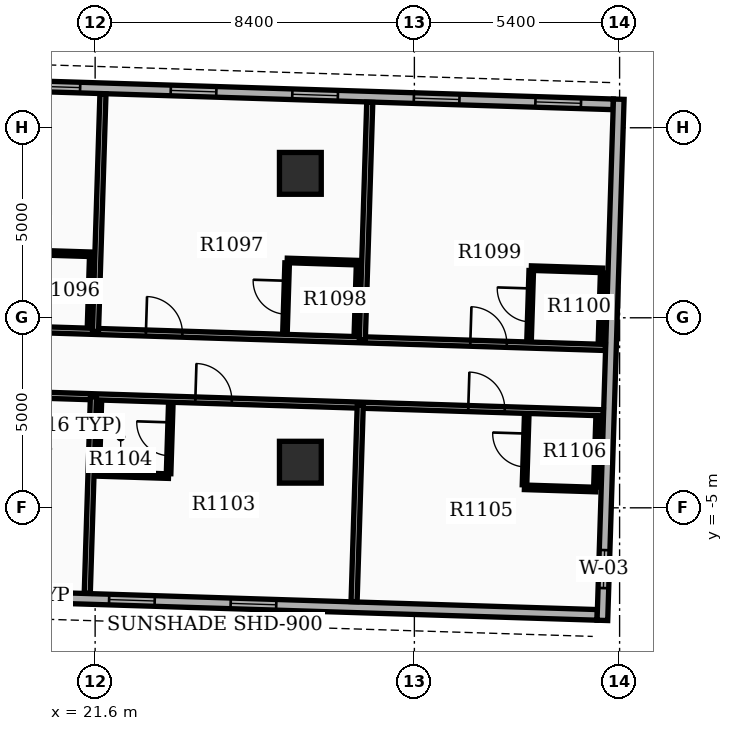
"""IFC4 building model, lengths in metres.
Left out: names, types, materials, properties, quantities, classifications, styles, units other than length and angle.
Written with IfcOpenShell. Run it as: python <this file> out.ifc"""

import sys

from ifc_helpers import new_model, si_unit, direction, frame, frame_2d, origin, origin_2d, place, context, subcontext, project, spatial, rectangle, extrude, element, fill, save


model = new_model("IFC4")
c1 = context("Model", 3, precision=1e-05, world=origin(), true_north=direction((0.0, 1.0)))
c2 = subcontext(c1, "Body", "Model", "MODEL_VIEW")
j1 = project(units=[si_unit("LENGTHUNIT", "METRE"), si_unit("PLANEANGLEUNIT", "RADIAN")], contexts=[c1])
p1 = place(None, origin())
s1 = spatial("IfcSite", under=j1, at=p1, CompositionType="ELEMENT")
p2 = place(p1, origin())
s2 = spatial("IfcBuilding", under=s1, at=p2, CompositionType="ELEMENT")
p3 = place(p2, frame((0.0, 0.0, 71.7)))
s3 = spatial("IfcBuildingStorey", under=s2, at=p3, CompositionType="ELEMENT", Elevation=71.7)
for number, where, z_axis, x_axis in (
    (1, (27.0, -3.8, 0.0), (0.0, 0.0, 1.0), (1.0, 0.0, 0.0)),
    (2, (27.0, 3.8, 0.0), (0.0, 0.0, 1.0), (1.0, 0.0, 0.0)),
):
    element("IfcColumn", number, at=place(p3, frame(where, z_axis=z_axis, x_axis=x_axis)), inside=s3, PredefinedType="COLUMN", context=c2, shape_type="SweptSolid", body=[
        extrude(rectangle(XDim=1.1, YDim=1.1, at=origin_2d()), origin(), (0.0, 0.0, 1.0), 3.9),
    ])
p4 = place(p3, frame((14.721, -7.186, 0.0), z_axis=(0.0, 0.0, 1.0), x_axis=(0.999506574096, -0.031410322165, 0.0)))
e3 = element("IfcWall", 3, at=p4, inside=s3, PredefinedType="STANDARD", context=c2, shape_type="SweptSolid", body=[
    extrude(rectangle(XDim=20.1, YDim=0.28, at=frame_2d((10.05, 0.0))), origin(), (0.0, 0.0, 1.0), 2.91),
])
p5 = place(p4, frame((4.05, 0.0, 0.8)))
e4 = element("IfcOpeningElement", 4, at=p5, cuts=e3, PredefinedType="OPENING", context=c2, shape_type="SweptSolid", body=[
    extrude(rectangle(XDim=1.2, YDim=1.6, at=frame_2d((0.6, 0.8))), frame((0.0, 0.15, 0.0), z_axis=(0.0, -1.0, 0.0), x_axis=(1.0, 0.0, 0.0)), (0.0, 0.0, 1.0), 0.3),
])
p6 = place(p4, frame((7.25, 0.0, 0.8)))
e5 = element("IfcOpeningElement", 5, at=p6, cuts=e3, PredefinedType="OPENING", context=c2, shape_type="SweptSolid", body=[
    extrude(rectangle(XDim=1.2, YDim=1.6, at=frame_2d((0.6, 0.8))), frame((0.0, 0.15, 0.0), z_axis=(0.0, -1.0, 0.0), x_axis=(1.0, 0.0, 0.0)), (0.0, 0.0, 1.0), 0.3),
])
p7 = place(p4, frame((10.45, 0.0, 0.8)))
e6 = element("IfcOpeningElement", 6, at=p7, cuts=e3, PredefinedType="OPENING", context=c2, shape_type="SweptSolid", body=[
    extrude(rectangle(XDim=1.2, YDim=1.6, at=frame_2d((0.6, 0.8))), frame((0.0, 0.15, 0.0), z_axis=(0.0, -1.0, 0.0), x_axis=(1.0, 0.0, 0.0)), (0.0, 0.0, 1.0), 0.3),
])
p8 = place(p4, frame((0.3, 0.0, 0.0)))
e7 = element("IfcOpeningElement", 7, at=p8, cuts=e3, PredefinedType="OPENING", context=c2, shape_type="SweptSolid", body=[
    extrude(rectangle(XDim=0.96, YDim=2.1, at=frame_2d((0.48, 1.05))), frame((0.0, 0.15, 0.0), z_axis=(0.0, -1.0, 0.0), x_axis=(1.0, 0.0, 0.0)), (0.0, 0.0, 1.0), 0.3),
])
p9 = place(p3, frame((35.234, 5.616, 0.0), z_axis=(0.0, 0.0, 1.0), x_axis=(-0.999506955354, 0.031398187845, 0.0)))
e8 = element("IfcWall", 8, at=p9, inside=s3, PredefinedType="STANDARD", context=c2, shape_type="SweptSolid", body=[
    extrude(rectangle(XDim=20.1, YDim=0.28, at=frame_2d((10.05, 0.0))), origin(), (0.0, 0.0, 1.0), 2.91),
])
p10 = place(p9, frame((0.85, 0.0, 0.8)))
e9 = element("IfcOpeningElement", 9, at=p10, cuts=e8, PredefinedType="OPENING", context=c2, shape_type="SweptSolid", body=[
    extrude(rectangle(XDim=1.2, YDim=1.6, at=frame_2d((0.6, 0.8))), frame((0.0, 0.15, 0.0), z_axis=(0.0, -1.0, 0.0), x_axis=(1.0, 0.0, 0.0)), (0.0, 0.0, 1.0), 0.3),
])
p11 = place(p9, frame((4.05, 0.0, 0.8)))
e10 = element("IfcOpeningElement", 10, at=p11, cuts=e8, PredefinedType="OPENING", context=c2, shape_type="SweptSolid", body=[
    extrude(rectangle(XDim=1.2, YDim=1.6, at=frame_2d((0.6, 0.8))), frame((0.0, 0.15, 0.0), z_axis=(0.0, -1.0, 0.0), x_axis=(1.0, 0.0, 0.0)), (0.0, 0.0, 1.0), 0.3),
])
p12 = place(p9, frame((7.25, 0.0, 0.8)))
e11 = element("IfcOpeningElement", 11, at=p12, cuts=e8, PredefinedType="OPENING", context=c2, shape_type="SweptSolid", body=[
    extrude(rectangle(XDim=1.2, YDim=1.6, at=frame_2d((0.6, 0.8))), frame((0.0, 0.15, 0.0), z_axis=(0.0, -1.0, 0.0), x_axis=(1.0, 0.0, 0.0)), (0.0, 0.0, 1.0), 0.3),
])
p13 = place(p9, frame((10.45, 0.0, 0.8)))
e12 = element("IfcOpeningElement", 12, at=p13, cuts=e8, PredefinedType="OPENING", context=c2, shape_type="SweptSolid", body=[
    extrude(rectangle(XDim=1.2, YDim=1.6, at=frame_2d((0.6, 0.8))), frame((0.0, 0.15, 0.0), z_axis=(0.0, -1.0, 0.0), x_axis=(1.0, 0.0, 0.0)), (0.0, 0.0, 1.0), 0.3),
])
p14 = place(p9, frame((14.035, 0.0, 0.85)))
e13 = element("IfcOpeningElement", 13, at=p14, cuts=e8, PredefinedType="OPENING", context=c2, shape_type="SweptSolid", body=[
    extrude(rectangle(XDim=1.2, YDim=1.6, at=frame_2d((0.6, 0.8))), frame((0.0, 0.15, 0.0), z_axis=(0.0, -1.0, 0.0), x_axis=(1.0, 0.0, 0.0)), (0.0, 0.0, 1.0), 0.3),
])
p15 = place(p3, frame((34.947, -7.962, 0.0), z_axis=(0.0, 0.0, 1.0), x_axis=(0.031406966164, 0.999506679556, 0.0)))
e14 = element("IfcWall", 14, at=p15, inside=s3, PredefinedType="STANDARD", context=c2, shape_type="SweptSolid", body=[
    extrude(rectangle(XDim=13.72, YDim=0.28, at=frame_2d((6.86, 0.0))), origin(), (0.0, 0.0, 1.0), 2.91),
])
p16 = place(p15, frame((0.85, 0.0, 0.85)))
e15 = element("IfcOpeningElement", 15, at=p16, cuts=e14, PredefinedType="OPENING", context=c2, shape_type="SweptSolid", body=[
    extrude(rectangle(XDim=1.0, YDim=1.5, at=frame_2d((0.5, 0.75))), frame((0.0, 0.15, 0.0), z_axis=(0.0, -1.0, 0.0), x_axis=(1.0, 0.0, 0.0)), (0.0, 0.0, 1.0), 0.3),
])
p17 = place(p3, frame((14.853, -0.146, 0.0), z_axis=(0.0, 0.0, 1.0), x_axis=(0.999506406629, -0.031415650687, 0.0)))
e16 = element("IfcWall", 16, at=p17, inside=s3, PredefinedType="PARTITIONING", context=c2, shape_type="SweptSolid", body=[
    extrude(rectangle(XDim=20.182, YDim=0.16, at=frame_2d((10.091, 0.0))), origin(), (0.0, 0.0, 1.0), 2.9),
])
p18 = place(p17, frame((0.45, 0.0, 0.0)))
e17 = element("IfcOpeningElement", 17, at=p18, cuts=e16, PredefinedType="OPENING", context=c2, shape_type="SweptSolid", body=[
    extrude(rectangle(XDim=0.96, YDim=2.15, at=frame_2d((0.48, 1.075))), frame((0.0, 0.09, 0.0), z_axis=(0.0, -1.0, 0.0), x_axis=(1.0, 0.0, 0.0)), (0.0, 0.0, 1.0), 0.18),
])
p19 = place(p17, frame((8.087, 0.0, 0.0)))
e18 = element("IfcOpeningElement", 18, at=p19, cuts=e16, PredefinedType="OPENING", context=c2, shape_type="SweptSolid", body=[
    extrude(rectangle(XDim=0.96, YDim=2.15, at=frame_2d((0.48, 1.075))), frame((0.0, 0.09, 0.0), z_axis=(0.0, -1.0, 0.0), x_axis=(1.0, 0.0, 0.0)), (0.0, 0.0, 1.0), 0.18),
])
p20 = place(p17, frame((16.627, 0.0, 0.0)))
e19 = element("IfcOpeningElement", 19, at=p20, cuts=e16, PredefinedType="OPENING", context=c2, shape_type="SweptSolid", body=[
    extrude(rectangle(XDim=0.96, YDim=2.15, at=frame_2d((0.48, 1.075))), frame((0.0, 0.09, 0.0), z_axis=(0.0, -1.0, 0.0), x_axis=(1.0, 0.0, 0.0)), (0.0, 0.0, 1.0), 0.18),
])
p21 = place(p3, frame((21.609, -0.359, 0.0), z_axis=(0.0, 0.0, 1.0), x_axis=(0.031435911097, 0.999505769615, 0.0)))
e20 = element("IfcWall", 20, at=p21, inside=s3, PredefinedType="PARTITIONING", context=c2, shape_type="SweptSolid", body=[
    extrude(rectangle(XDim=6.252, YDim=0.16, at=frame_2d((3.126, 0.0))), origin(), (0.0, 0.0, 1.0), 2.9),
])
p22 = place(p3, frame((21.454, -0.214, 0.0), z_axis=(0.0, 0.0, 1.0), x_axis=(0.031389704724, 0.999507221803, 0.0)))
e21 = element("IfcWall", 21, at=p22, inside=s3, PredefinedType="PARTITIONING", context=c2, shape_type="SweptSolid", body=[
    extrude(rectangle(XDim=1.82, YDim=0.12, at=frame_2d((0.91, 0.0))), origin(), (0.0, 0.0, 1.0), 2.9),
])
p23 = place(p3, frame((19.634, 1.729, 0.0), z_axis=(0.0, 0.0, 1.0), x_axis=(0.999510173889, -0.031295563454, 0.0)))
e22 = element("IfcWall", 22, at=p23, inside=s3, PredefinedType="PARTITIONING", context=c2, shape_type="SweptSolid", body=[
    extrude(rectangle(XDim=1.88, YDim=0.12, at=frame_2d((0.94, 0.0))), origin(), (0.0, 0.0, 1.0), 2.9),
])
p24 = place(p3, frame((28.63, -0.58, 0.0), z_axis=(0.0, 0.0, 1.0), x_axis=(0.031434684154, 0.999505808203, 0.0)))
e23 = element("IfcWall", 23, at=p24, inside=s3, PredefinedType="PARTITIONING", context=c2, shape_type="SweptSolid", body=[
    extrude(rectangle(XDim=6.252, YDim=0.16, at=frame_2d((3.126, 0.0))), origin(), (0.0, 0.0, 1.0), 2.9),
])
p25 = place(p3, frame((26.595, -0.375, 0.0), z_axis=(0.0, 0.0, 1.0), x_axis=(0.03152371574, 0.999503004171, 0.0)))
e24 = element("IfcWall", 24, at=p25, inside=s3, PredefinedType="PARTITIONING", context=c2, shape_type="SweptSolid", body=[
    extrude(rectangle(XDim=1.82, YDim=0.12, at=frame_2d((0.91, 0.0))), origin(), (0.0, 0.0, 1.0), 2.9),
])
p26 = place(p25, frame((0.47, 0.0, 0.0)))
e25 = element("IfcOpeningElement", 25, at=p26, cuts=e24, PredefinedType="OPENING", context=c2, shape_type="SweptSolid", body=[
    extrude(rectangle(XDim=0.88, YDim=2.1, at=frame_2d((0.44, 1.05))), frame((0.0, 0.07, 0.0), z_axis=(0.0, -1.0, 0.0), x_axis=(1.0, 0.0, 0.0)), (0.0, 0.0, 1.0), 0.14),
])
p27 = place(p3, frame((28.474, -0.435, 0.0), z_axis=(0.0, 0.0, 1.0), x_axis=(0.031389704724, 0.999507221803, 0.0)))
e26 = element("IfcWall", 26, at=p27, inside=s3, PredefinedType="PARTITIONING", context=c2, shape_type="SweptSolid", body=[
    extrude(rectangle(XDim=1.82, YDim=0.12, at=frame_2d((0.91, 0.0))), origin(), (0.0, 0.0, 1.0), 2.9),
])
p28 = place(p3, frame((26.655, 1.509, 0.0), z_axis=(0.0, 0.0, 1.0), x_axis=(0.999506103526, -0.031425292588, 0.0)))
e27 = element("IfcWall", 27, at=p28, inside=s3, PredefinedType="PARTITIONING", context=c2, shape_type="SweptSolid", body=[
    extrude(rectangle(XDim=1.88, YDim=0.12, at=frame_2d((0.94, 0.0))), origin(), (0.0, 0.0, 1.0), 2.9),
])
p29 = place(p3, frame((33.018, -0.577, 0.0), z_axis=(0.0, 0.0, 1.0), x_axis=(0.031255692016, 0.999511421504, 0.0)))
e28 = element("IfcWall", 28, at=p29, inside=s3, PredefinedType="PARTITIONING", context=c2, shape_type="SweptSolid", body=[
    extrude(rectangle(XDim=1.82, YDim=0.12, at=frame_2d((0.91, 0.0))), origin(), (0.0, 0.0, 1.0), 2.9),
])
p30 = place(p29, frame((0.47, 0.0, 0.0)))
e29 = element("IfcOpeningElement", 29, at=p30, cuts=e28, PredefinedType="OPENING", context=c2, shape_type="SweptSolid", body=[
    extrude(rectangle(XDim=0.88, YDim=2.1, at=frame_2d((0.44, 1.05))), frame((0.0, 0.07, 0.0), z_axis=(0.0, -1.0, 0.0), x_axis=(1.0, 0.0, 0.0)), (0.0, 0.0, 1.0), 0.14),
])
p31 = place(p3, frame((34.897, -0.636, 0.0), z_axis=(0.0, 0.0, 1.0), x_axis=(0.031389704724, 0.999507221803, 0.0)))
e30 = element("IfcWall", 30, at=p31, inside=s3, PredefinedType="PARTITIONING", context=c2, shape_type="SweptSolid", body=[
    extrude(rectangle(XDim=1.82, YDim=0.12, at=frame_2d((0.91, 0.0))), origin(), (0.0, 0.0, 1.0), 2.9),
])
p32 = place(p3, frame((33.077, 1.307, 0.0), z_axis=(0.0, 0.0, 1.0), x_axis=(0.999505975261, -0.031429371883, 0.0)))
e31 = element("IfcWall", 31, at=p32, inside=s3, PredefinedType="PARTITIONING", context=c2, shape_type="SweptSolid", body=[
    extrude(rectangle(XDim=1.88, YDim=0.12, at=frame_2d((0.94, 0.0))), origin(), (0.0, 0.0, 1.0), 2.9),
])
p33 = place(p3, frame((14.799, -1.866, 0.0), z_axis=(0.0, 0.0, 1.0), x_axis=(0.999506406629, -0.031415650687, 0.0)))
e32 = element("IfcWall", 32, at=p33, inside=s3, PredefinedType="PARTITIONING", context=c2, shape_type="SweptSolid", body=[
    extrude(rectangle(XDim=20.182, YDim=0.16, at=frame_2d((10.091, 0.0))), origin(), (0.0, 0.0, 1.0), 2.9),
])
p34 = place(p33, frame((2.656, 0.0, 0.0)))
e33 = element("IfcOpeningElement", 33, at=p34, cuts=e32, PredefinedType="OPENING", context=c2, shape_type="SweptSolid", body=[
    extrude(rectangle(XDim=0.96, YDim=2.15, at=frame_2d((0.48, 1.075))), frame((0.0, 0.09, 0.0), z_axis=(0.0, -1.0, 0.0), x_axis=(1.0, 0.0, 0.0)), (0.0, 0.0, 1.0), 0.18),
])
p35 = place(p33, frame((9.442, 0.0, 0.0)))
e34 = element("IfcOpeningElement", 34, at=p35, cuts=e32, PredefinedType="OPENING", context=c2, shape_type="SweptSolid", body=[
    extrude(rectangle(XDim=0.96, YDim=2.15, at=frame_2d((0.48, 1.075))), frame((0.0, 0.09, 0.0), z_axis=(0.0, -1.0, 0.0), x_axis=(1.0, 0.0, 0.0)), (0.0, 0.0, 1.0), 0.18),
])
p36 = place(p33, frame((16.627, 0.0, 0.0)))
e35 = element("IfcOpeningElement", 35, at=p36, cuts=e32, PredefinedType="OPENING", context=c2, shape_type="SweptSolid", body=[
    extrude(rectangle(XDim=0.96, YDim=2.15, at=frame_2d((0.48, 1.075))), frame((0.0, 0.09, 0.0), z_axis=(0.0, -1.0, 0.0), x_axis=(1.0, 0.0, 0.0)), (0.0, 0.0, 1.0), 0.18),
])
p37 = place(p3, frame((21.555, -2.078, 0.0), z_axis=(0.0, 0.0, 1.0), x_axis=(-0.031390964211, -0.999507182248, 0.0)))
e36 = element("IfcWall", 36, at=p37, inside=s3, PredefinedType="PARTITIONING", context=c2, shape_type="SweptSolid", body=[
    extrude(rectangle(XDim=5.172, YDim=0.16, at=frame_2d((2.586, 0.0))), origin(), (0.0, 0.0, 1.0), 2.9),
])
p38 = place(p3, frame((28.576, -2.299, 0.0), z_axis=(0.0, 0.0, 1.0), x_axis=(-0.031436638834, -0.999505746726, 0.0)))
e37 = element("IfcWall", 37, at=p38, inside=s3, PredefinedType="PARTITIONING", context=c2, shape_type="SweptSolid", body=[
    extrude(rectangle(XDim=5.172, YDim=0.16, at=frame_2d((2.586, 0.0))), origin(), (0.0, 0.0, 1.0), 2.9),
])
p39 = place(p3, frame((23.533, -4.101, 0.0), z_axis=(0.0, 0.0, 1.0), x_axis=(0.031519489708, 0.999503137448, 0.0)))
e38 = element("IfcWall", 38, at=p39, inside=s3, PredefinedType="PARTITIONING", context=c2, shape_type="SweptSolid", body=[
    extrude(rectangle(XDim=1.82, YDim=0.12, at=frame_2d((0.91, 0.0))), origin(), (0.0, 0.0, 1.0), 2.9),
])
p40 = place(p39, frame((0.47, 0.0, 0.0)))
e39 = element("IfcOpeningElement", 39, at=p40, cuts=e38, PredefinedType="OPENING", context=c2, shape_type="SweptSolid", body=[
    extrude(rectangle(XDim=0.88, YDim=2.1, at=frame_2d((0.44, 1.05))), frame((0.0, 0.07, 0.0), z_axis=(0.0, -1.0, 0.0), x_axis=(1.0, 0.0, 0.0)), (0.0, 0.0, 1.0), 0.14),
])
p41 = place(p3, frame((21.654, -4.042, 0.0), z_axis=(0.0, 0.0, 1.0), x_axis=(0.031389704724, 0.999507221803, 0.0)))
e40 = element("IfcWall", 40, at=p41, inside=s3, PredefinedType="PARTITIONING", context=c2, shape_type="SweptSolid", body=[
    extrude(rectangle(XDim=1.82, YDim=0.12, at=frame_2d((0.91, 0.0))), origin(), (0.0, 0.0, 1.0), 2.9),
])
p42 = place(p3, frame((21.652, -4.107, 0.0), z_axis=(0.0, 0.0, 1.0), x_axis=(0.999506103526, -0.031425292588, 0.0)))
e41 = element("IfcWall", 41, at=p42, inside=s3, PredefinedType="PARTITIONING", context=c2, shape_type="SweptSolid", body=[
    extrude(rectangle(XDim=1.88, YDim=0.12, at=frame_2d((0.94, 0.0))), origin(), (0.0, 0.0, 1.0), 2.9),
])
p43 = place(p3, frame((32.898, -4.396, 0.0), z_axis=(0.0, 0.0, 1.0), x_axis=(0.031389704724, 0.999507221803, 0.0)))
e42 = element("IfcWall", 42, at=p43, inside=s3, PredefinedType="PARTITIONING", context=c2, shape_type="SweptSolid", body=[
    extrude(rectangle(XDim=1.82, YDim=0.12, at=frame_2d((0.91, 0.0))), origin(), (0.0, 0.0, 1.0), 2.9),
])
p44 = place(p43, frame((0.47, 0.0, 0.0)))
e43 = element("IfcOpeningElement", 43, at=p44, cuts=e42, PredefinedType="OPENING", context=c2, shape_type="SweptSolid", body=[
    extrude(rectangle(XDim=0.88, YDim=2.1, at=frame_2d((0.44, 1.05))), frame((0.0, 0.07, 0.0), z_axis=(0.0, -1.0, 0.0), x_axis=(1.0, 0.0, 0.0)), (0.0, 0.0, 1.0), 0.14),
])
p45 = place(p3, frame((34.777, -4.455, 0.0), z_axis=(0.0, 0.0, 1.0), x_axis=(0.03152371574, 0.999503004171, 0.0)))
e44 = element("IfcWall", 44, at=p45, inside=s3, PredefinedType="PARTITIONING", context=c2, shape_type="SweptSolid", body=[
    extrude(rectangle(XDim=1.82, YDim=0.12, at=frame_2d((0.91, 0.0))), origin(), (0.0, 0.0, 1.0), 2.9),
])
p46 = place(p3, frame((32.896, -4.46, 0.0), z_axis=(0.0, 0.0, 1.0), x_axis=(0.999506103526, -0.031425292588, 0.0)))
e45 = element("IfcWall", 45, at=p46, inside=s3, PredefinedType="PARTITIONING", context=c2, shape_type="SweptSolid", body=[
    extrude(rectangle(XDim=1.88, YDim=0.12, at=frame_2d((0.94, 0.0))), origin(), (0.0, 0.0, 1.0), 2.9),
])
p47 = place(p6, origin())
e46 = element("IfcWindow", 46, at=p47, inside=s3, PartitioningType="SINGLE_PANEL", PredefinedType="WINDOW", context=c2, shape_type="SweptSolid", body=[
    extrude(rectangle(XDim=1.2, YDim=1.6, at=frame_2d((0.6, 0.8))), frame((0.0, 0.03, 0.0), z_axis=(0.0, -1.0, 0.0), x_axis=(1.0, 0.0, 0.0)), (0.0, 0.0, 1.0), 0.06),
])
fill(e5, e46)
p48 = place(p7, origin())
e47 = element("IfcWindow", 47, at=p48, inside=s3, PartitioningType="SINGLE_PANEL", PredefinedType="WINDOW", context=c2, shape_type="SweptSolid", body=[
    extrude(rectangle(XDim=1.2, YDim=1.6, at=frame_2d((0.6, 0.8))), frame((0.0, 0.03, 0.0), z_axis=(0.0, -1.0, 0.0), x_axis=(1.0, 0.0, 0.0)), (0.0, 0.0, 1.0), 0.06),
])
fill(e6, e47)
p49 = place(p10, origin())
e48 = element("IfcWindow", 48, at=p49, inside=s3, PartitioningType="SINGLE_PANEL", PredefinedType="WINDOW", context=c2, shape_type="SweptSolid", body=[
    extrude(rectangle(XDim=1.2, YDim=1.6, at=frame_2d((0.6, 0.8))), frame((0.0, 0.03, 0.0), z_axis=(0.0, -1.0, 0.0), x_axis=(1.0, 0.0, 0.0)), (0.0, 0.0, 1.0), 0.06),
])
fill(e9, e48)
p50 = place(p11, origin())
e49 = element("IfcWindow", 49, at=p50, inside=s3, PartitioningType="SINGLE_PANEL", PredefinedType="WINDOW", context=c2, shape_type="SweptSolid", body=[
    extrude(rectangle(XDim=1.2, YDim=1.6, at=frame_2d((0.6, 0.8))), frame((0.0, 0.03, 0.0), z_axis=(0.0, -1.0, 0.0), x_axis=(1.0, 0.0, 0.0)), (0.0, 0.0, 1.0), 0.06),
])
fill(e10, e49)
p51 = place(p12, origin())
e50 = element("IfcWindow", 50, at=p51, inside=s3, PartitioningType="SINGLE_PANEL", PredefinedType="WINDOW", context=c2, shape_type="SweptSolid", body=[
    extrude(rectangle(XDim=1.2, YDim=1.6, at=frame_2d((0.6, 0.8))), frame((0.0, 0.03, 0.0), z_axis=(0.0, -1.0, 0.0), x_axis=(1.0, 0.0, 0.0)), (0.0, 0.0, 1.0), 0.06),
])
fill(e11, e50)
p52 = place(p13, origin())
e51 = element("IfcWindow", 51, at=p52, inside=s3, PartitioningType="SINGLE_PANEL", PredefinedType="WINDOW", context=c2, shape_type="SweptSolid", body=[
    extrude(rectangle(XDim=1.2, YDim=1.6, at=frame_2d((0.6, 0.8))), frame((0.0, 0.03, 0.0), z_axis=(0.0, -1.0, 0.0), x_axis=(1.0, 0.0, 0.0)), (0.0, 0.0, 1.0), 0.06),
])
fill(e12, e51)
p53 = place(p16, origin())
e52 = element("IfcWindow", 52, at=p53, inside=s3, PartitioningType="SINGLE_PANEL", PredefinedType="WINDOW", context=c2, shape_type="SweptSolid", body=[
    extrude(rectangle(XDim=1.0, YDim=1.5, at=frame_2d((0.5, 0.75))), frame((0.0, 0.03, 0.0), z_axis=(0.0, -1.0, 0.0), x_axis=(1.0, 0.0, 0.0)), (0.0, 0.0, 1.0), 0.06),
])
fill(e15, e52)
p54 = place(p14, origin())
e53 = element("IfcWindow", 53, at=p54, inside=s3, PartitioningType="SINGLE_PANEL", PredefinedType="WINDOW", context=c2, shape_type="SweptSolid", body=[
    extrude(rectangle(XDim=1.2, YDim=1.6, at=frame_2d((0.6, 0.8))), frame((0.0, 0.03, 0.0), z_axis=(0.0, -1.0, 0.0), x_axis=(1.0, 0.0, 0.0)), (0.0, 0.0, 1.0), 0.06),
])
fill(e13, e53)
p55 = place(p19, origin())
e54 = element("IfcDoor", 54, at=p55, inside=s3, OperationType="SINGLE_SWING_LEFT", PredefinedType="DOOR", context=c2, shape_type="SweptSolid", body=[
    extrude(rectangle(XDim=0.96, YDim=2.15, at=frame_2d((0.48, 1.075))), frame((0.0, 0.025, 0.0), z_axis=(0.0, -1.0, 0.0), x_axis=(1.0, 0.0, 0.0)), (0.0, 0.0, 1.0), 0.05),
])
fill(e18, e54)
p56 = place(p26, origin())
e55 = element("IfcDoor", 55, at=p56, inside=s3, OperationType="SINGLE_SWING_RIGHT", PredefinedType="DOOR", context=c2, shape_type="SweptSolid", body=[
    extrude(rectangle(XDim=0.88, YDim=2.1, at=frame_2d((0.44, 1.05))), frame((0.0, 0.025, 0.0), z_axis=(0.0, -1.0, 0.0), x_axis=(1.0, 0.0, 0.0)), (0.0, 0.0, 1.0), 0.05),
])
fill(e25, e55)
p57 = place(p20, origin())
e56 = element("IfcDoor", 56, at=p57, inside=s3, OperationType="SINGLE_SWING_LEFT", PredefinedType="DOOR", context=c2, shape_type="SweptSolid", body=[
    extrude(rectangle(XDim=0.96, YDim=2.15, at=frame_2d((0.48, 1.075))), frame((0.0, 0.025, 0.0), z_axis=(0.0, -1.0, 0.0), x_axis=(1.0, 0.0, 0.0)), (0.0, 0.0, 1.0), 0.05),
])
fill(e19, e56)
p58 = place(p30, origin())
e57 = element("IfcDoor", 57, at=p58, inside=s3, OperationType="SINGLE_SWING_RIGHT", PredefinedType="DOOR", context=c2, shape_type="SweptSolid", body=[
    extrude(rectangle(XDim=0.88, YDim=2.1, at=frame_2d((0.44, 1.05))), frame((0.0, 0.025, 0.0), z_axis=(0.0, -1.0, 0.0), x_axis=(1.0, 0.0, 0.0)), (0.0, 0.0, 1.0), 0.05),
])
fill(e29, e57)
p59 = place(p35, origin())
e58 = element("IfcDoor", 58, at=p59, inside=s3, OperationType="SINGLE_SWING_LEFT", PredefinedType="DOOR", context=c2, shape_type="SweptSolid", body=[
    extrude(rectangle(XDim=0.96, YDim=2.15, at=frame_2d((0.48, 1.075))), frame((0.0, 0.025, 0.0), z_axis=(0.0, -1.0, 0.0), x_axis=(1.0, 0.0, 0.0)), (0.0, 0.0, 1.0), 0.05),
])
fill(e34, e58)
p60 = place(p40, origin())
e59 = element("IfcDoor", 59, at=p60, inside=s3, OperationType="SINGLE_SWING_RIGHT", PredefinedType="DOOR", context=c2, shape_type="SweptSolid", body=[
    extrude(rectangle(XDim=0.88, YDim=2.1, at=frame_2d((0.44, 1.05))), frame((0.0, 0.025, 0.0), z_axis=(0.0, -1.0, 0.0), x_axis=(1.0, 0.0, 0.0)), (0.0, 0.0, 1.0), 0.05),
])
fill(e39, e59)
p61 = place(p36, origin())
e60 = element("IfcDoor", 60, at=p61, inside=s3, OperationType="SINGLE_SWING_LEFT", PredefinedType="DOOR", context=c2, shape_type="SweptSolid", body=[
    extrude(rectangle(XDim=0.96, YDim=2.15, at=frame_2d((0.48, 1.075))), frame((0.0, 0.025, 0.0), z_axis=(0.0, -1.0, 0.0), x_axis=(1.0, 0.0, 0.0)), (0.0, 0.0, 1.0), 0.05),
])
fill(e35, e60)
p62 = place(p44, origin())
e61 = element("IfcDoor", 61, at=p62, inside=s3, OperationType="SINGLE_SWING_RIGHT", PredefinedType="DOOR", context=c2, shape_type="SweptSolid", body=[
    extrude(rectangle(XDim=0.88, YDim=2.1, at=frame_2d((0.44, 1.05))), frame((0.0, 0.025, 0.0), z_axis=(0.0, -1.0, 0.0), x_axis=(1.0, 0.0, 0.0)), (0.0, 0.0, 1.0), 0.05),
])
fill(e43, e61)
save(model, sys.argv[1])
